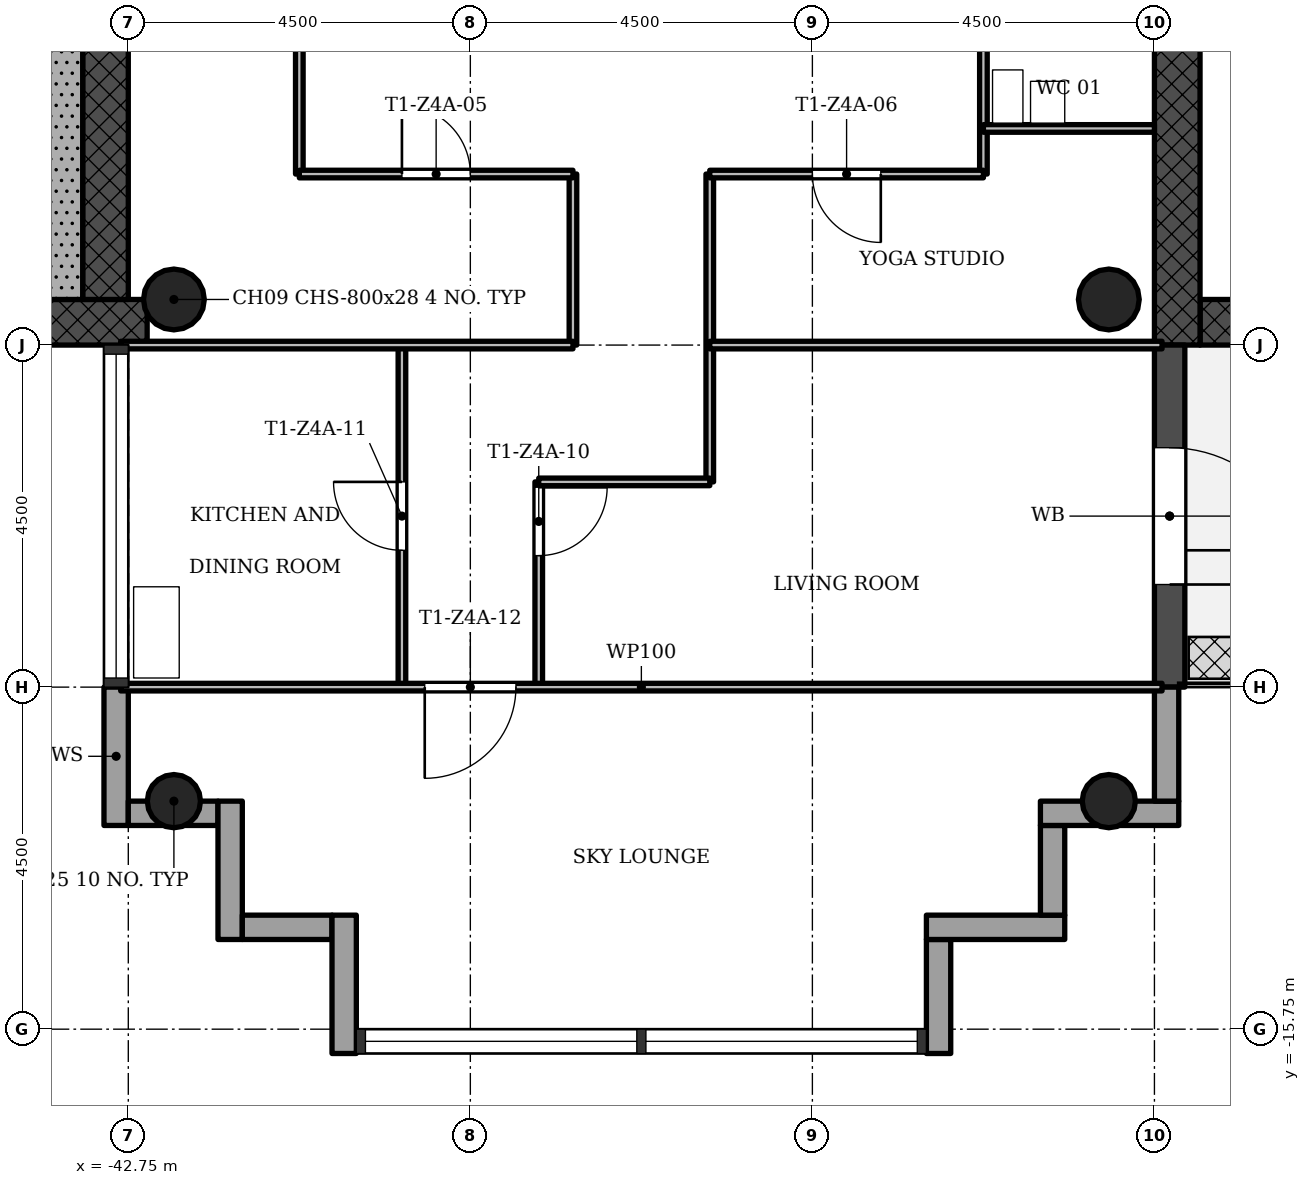
"""IFC4 building model, lengths in metres.
Left out: names, types, materials, properties, quantities, classifications, styles, units other than length and angle.
Written with IfcOpenShell. Run it as: python <this file> out.ifc"""

import sys

from ifc_helpers import new_model, si_unit, direction, frame, frame_2d, origin, origin_2d, place, context, subcontext, project, spatial, rectangle, hollow_circle, extrude, element, fill, save


model = new_model("IFC4")
c1 = context("Model", 3, precision=1e-05, world=origin(), true_north=direction((0.0, 1.0)))
c2 = subcontext(c1, "Body", "Model", "MODEL_VIEW")
j1 = project(units=[si_unit("LENGTHUNIT", "METRE"), si_unit("PLANEANGLEUNIT", "RADIAN")], contexts=[c1])
p1 = place(None, origin())
s1 = spatial("IfcSite", under=j1, at=p1, CompositionType="ELEMENT")
p2 = place(p1, origin())
s2 = spatial("IfcBuilding", under=s1, at=p2, CompositionType="ELEMENT")
p3 = place(p2, frame((0.0, 0.0, 226.6)))
s3 = spatial("IfcBuildingStorey", under=s2, at=p3, CompositionType="ELEMENT", Elevation=226.6)
p4 = place(p3, frame((-28.65, -6.45, 0.0), z_axis=(0.0, 0.0, 1.0), x_axis=(1.0, 0.0, 0.0)))
e1 = element("IfcWall", 1, at=p4, inside=s3, PredefinedType="SHEAR", context=c2, shape_type="SweptSolid", body=[
    extrude(rectangle(XDim=8.4, YDim=0.6, at=frame_2d((4.2, 0.0))), origin(), (0.0, 0.0, 1.0), 3.4),
])
p5 = place(p3, frame((-28.95, 6.15, 0.0), z_axis=(0.0, 0.0, 1.0), x_axis=(0.0, -1.0, 0.0)))
e2 = element("IfcWall", 2, at=p5, inside=s3, PredefinedType="SHEAR", context=c2, shape_type="SweptSolid", body=[
    extrude(rectangle(XDim=12.9, YDim=0.6, at=frame_2d((6.45, 0.0))), origin(), (0.0, 0.0, 1.0), 3.4),
])
p6 = place(p5, frame((5.25, 0.0, 0.0)))
e3 = element("IfcOpeningElement", 3, at=p6, cuts=e2, PredefinedType="OPENING", context=c2, shape_type="SweptSolid", body=[
    extrude(rectangle(XDim=1.8, YDim=2.1, at=frame_2d((0.9, 1.05))), frame((0.0, 0.31, 0.0), z_axis=(0.0, -1.0, 0.0), x_axis=(1.0, 0.0, 0.0)), (0.0, 0.0, 1.0), 0.62),
])
p7 = place(p3, frame((-51.15, -6.45, 0.0), z_axis=(0.0, 0.0, 1.0), x_axis=(1.0, 0.0, 0.0)))
e4 = element("IfcWall", 4, at=p7, inside=s3, PredefinedType="SHEAR", context=c2, shape_type="SweptSolid", body=[
    extrude(rectangle(XDim=8.648, YDim=0.6, at=frame_2d((4.324, 0.0))), origin(), (0.0, 0.0, 1.0), 3.4),
])
p8 = place(p3, frame((-43.05, -6.15, 0.0), z_axis=(0.0, 0.0, 1.0), x_axis=(0.0, 1.0, 0.0)))
e5 = element("IfcWall", 5, at=p8, inside=s3, PredefinedType="SHEAR", context=c2, shape_type="SweptSolid", body=[
    extrude(rectangle(XDim=12.9, YDim=0.6, at=frame_2d((6.45, 0.0))), origin(), (0.0, 0.0, 1.0), 3.4),
])
p9 = place(p8, frame((5.25, 0.0, 0.0)))
e6 = element("IfcOpeningElement", 6, at=p9, cuts=e5, PredefinedType="OPENING", context=c2, shape_type="SweptSolid", body=[
    extrude(rectangle(XDim=1.8, YDim=2.1, at=frame_2d((0.9, 1.05))), frame((0.0, 0.31, 0.0), z_axis=(0.0, -1.0, 0.0), x_axis=(1.0, 0.0, 0.0)), (0.0, 0.0, 1.0), 0.62),
])
for number, where, z_axis, x_axis in (
    (7, (-42.15, -12.75, 0.0), (0.0, 0.0, 1.0), (1.0, 0.0, 0.0)),
    (8, (-29.85, -12.75, 0.0), (0.0, 0.0, 1.0), (1.0, 0.0, 0.0)),
):
    element("IfcColumn", number, at=place(p3, frame(where, z_axis=z_axis, x_axis=x_axis)), inside=s3, PredefinedType="COLUMN", context=c2, shape_type="SweptSolid", body=[
        extrude(hollow_circle(Radius=0.35, WallThickness=0.025, at=origin_2d()), origin(), (0.0, 0.0, 1.0), 3.4),
    ])
for number, where, z_axis, x_axis in (
    (9, (-42.15, -6.15, 0.0), (0.0, 0.0, 1.0), (1.0, 0.0, 0.0)),
    (10, (-29.85, -6.15, 0.0), (0.0, 0.0, 1.0), (1.0, 0.0, 0.0)),
):
    element("IfcColumn", number, at=place(p3, frame(where, z_axis=z_axis, x_axis=x_axis)), inside=s3, PredefinedType="COLUMN", context=c2, shape_type="SweptSolid", body=[
        extrude(hollow_circle(Radius=0.4, WallThickness=0.028, at=origin_2d()), origin(), (0.0, 0.0, 1.0), 3.4),
    ])
p10 = place(p3, frame((-42.91, -11.25, -0.3), z_axis=(0.0, 0.0, 1.0), x_axis=(0.0, -1.0, 0.0)))
e11 = element("IfcWall", 11, at=p10, inside=s3, PredefinedType="STANDARD", context=c2, shape_type="SweptSolid", body=[
    extrude(rectangle(XDim=1.82, YDim=0.32, at=frame_2d((0.91, 0.0))), origin(), (0.0, 0.0, 1.0), 3.4),
])
p11 = place(p3, frame((-42.75, -12.91, -0.3), z_axis=(0.0, 0.0, 1.0), x_axis=(1.0, 0.0, 0.0)))
e12 = element("IfcWall", 12, at=p11, inside=s3, PredefinedType="STANDARD", context=c2, shape_type="SweptSolid", body=[
    extrude(rectangle(XDim=1.18, YDim=0.32, at=frame_2d((0.59, 0.0))), origin(), (0.0, 0.0, 1.0), 3.4),
])
p12 = place(p3, frame((-41.41, -12.75, -0.3), z_axis=(0.0, 0.0, 1.0), x_axis=(0.0, -1.0, 0.0)))
e13 = element("IfcWall", 13, at=p12, inside=s3, PredefinedType="STANDARD", context=c2, shape_type="SweptSolid", body=[
    extrude(rectangle(XDim=1.82, YDim=0.32, at=frame_2d((0.91, 0.0))), origin(), (0.0, 0.0, 1.0), 3.4),
])
p13 = place(p3, frame((-41.25, -14.41, -0.3), z_axis=(0.0, 0.0, 1.0), x_axis=(1.0, 0.0, 0.0)))
e14 = element("IfcWall", 14, at=p13, inside=s3, PredefinedType="STANDARD", context=c2, shape_type="SweptSolid", body=[
    extrude(rectangle(XDim=1.18, YDim=0.32, at=frame_2d((0.59, 0.0))), origin(), (0.0, 0.0, 1.0), 3.4),
])
p14 = place(p3, frame((-39.91, -14.25, -0.3), z_axis=(0.0, 0.0, 1.0), x_axis=(0.0, -1.0, 0.0)))
e15 = element("IfcWall", 15, at=p14, inside=s3, PredefinedType="STANDARD", context=c2, shape_type="SweptSolid", body=[
    extrude(rectangle(XDim=1.82, YDim=0.32, at=frame_2d((0.91, 0.0))), origin(), (0.0, 0.0, 1.0), 3.4),
])
p15 = place(p3, frame((-32.09, -16.07, -0.3), z_axis=(0.0, 0.0, 1.0), x_axis=(0.0, 1.0, 0.0)))
e16 = element("IfcWall", 16, at=p15, inside=s3, PredefinedType="STANDARD", context=c2, shape_type="SweptSolid", body=[
    extrude(rectangle(XDim=1.5, YDim=0.32, at=frame_2d((0.75, 0.0))), origin(), (0.0, 0.0, 1.0), 3.4),
])
p16 = place(p3, frame((-32.25, -14.41, -0.3), z_axis=(0.0, 0.0, 1.0), x_axis=(1.0, 0.0, 0.0)))
e17 = element("IfcWall", 17, at=p16, inside=s3, PredefinedType="STANDARD", context=c2, shape_type="SweptSolid", body=[
    extrude(rectangle(XDim=1.82, YDim=0.32, at=frame_2d((0.91, 0.0))), origin(), (0.0, 0.0, 1.0), 3.4),
])
p17 = place(p3, frame((-30.59, -14.25, -0.3), z_axis=(0.0, 0.0, 1.0), x_axis=(0.0, 1.0, 0.0)))
e18 = element("IfcWall", 18, at=p17, inside=s3, PredefinedType="STANDARD", context=c2, shape_type="SweptSolid", body=[
    extrude(rectangle(XDim=1.18, YDim=0.32, at=frame_2d((0.59, 0.0))), origin(), (0.0, 0.0, 1.0), 3.4),
])
p18 = place(p3, frame((-30.75, -12.91, -0.3), z_axis=(0.0, 0.0, 1.0), x_axis=(1.0, 0.0, 0.0)))
e19 = element("IfcWall", 19, at=p18, inside=s3, PredefinedType="STANDARD", context=c2, shape_type="SweptSolid", body=[
    extrude(rectangle(XDim=1.82, YDim=0.32, at=frame_2d((0.91, 0.0))), origin(), (0.0, 0.0, 1.0), 3.4),
])
p19 = place(p3, frame((-29.09, -12.75, -0.3), z_axis=(0.0, 0.0, 1.0), x_axis=(0.0, 1.0, 0.0)))
e20 = element("IfcWall", 20, at=p19, inside=s3, PredefinedType="STANDARD", context=c2, shape_type="SweptSolid", body=[
    extrude(rectangle(XDim=1.5, YDim=0.32, at=frame_2d((0.75, 0.0))), origin(), (0.0, 0.0, 1.0), 3.4),
])
p20 = place(p3, frame((-29.05, -11.25, -0.02), z_axis=(0.0, 0.0, 1.0), x_axis=(0.0, 1.0, 0.0)))
e21 = element("IfcWall", 21, at=p20, inside=s3, PredefinedType="STANDARD", context=c2, shape_type="SweptSolid", body=[
    extrude(rectangle(XDim=4.5, YDim=0.4, at=frame_2d((2.25, 0.0))), origin(), (0.0, 0.0, 1.0), 3.12),
])
p21 = place(p20, frame((1.35, 0.0, 0.02)))
e22 = element("IfcOpeningElement", 22, at=p21, cuts=e21, PredefinedType="OPENING", context=c2, shape_type="SweptSolid", body=[
    extrude(rectangle(XDim=1.8, YDim=2.1, at=frame_2d((0.9, 1.05))), frame((0.0, 0.21, 0.0), z_axis=(0.0, -1.0, 0.0), x_axis=(1.0, 0.0, 0.0)), (0.0, 0.0, 1.0), 0.42),
])
p22 = place(p3, frame((-40.5, -4.5, 0.0), z_axis=(0.0, 0.0, 1.0), x_axis=(0.0, 1.0, 0.0)))
e23 = element("IfcWall", 23, at=p22, inside=s3, PredefinedType="PARTITIONING", context=c2, shape_type="SweptSolid", body=[
    extrude(rectangle(XDim=3.0, YDim=0.1, at=frame_2d((1.5, 0.0))), origin(), (0.0, 0.0, 1.0), 3.0),
])
p23 = place(p3, frame((-39.15, -11.25, 0.0), z_axis=(0.0, 0.0, 1.0), x_axis=(0.0, 1.0, 0.0)))
e24 = element("IfcWall", 24, at=p23, inside=s3, PredefinedType="PARTITIONING", context=c2, shape_type="SweptSolid", body=[
    extrude(rectangle(XDim=4.5, YDim=0.1, at=frame_2d((2.25, 0.0))), origin(), (0.0, 0.0, 1.0), 3.0),
])
p24 = place(p23, frame((1.8, 0.0, 0.0)))
e25 = element("IfcOpeningElement", 25, at=p24, cuts=e24, PredefinedType="OPENING", context=c2, shape_type="SweptSolid", body=[
    extrude(rectangle(XDim=0.9, YDim=2.1, at=frame_2d((0.45, 1.05))), frame((0.0, 0.06, 0.0), z_axis=(0.0, -1.0, 0.0), x_axis=(1.0, 0.0, 0.0)), (0.0, 0.0, 1.0), 0.12),
])
p25 = place(p3, frame((-37.35, -11.25, 0.0), z_axis=(0.0, 0.0, 1.0), x_axis=(0.0, 1.0, 0.0)))
e26 = element("IfcWall", 26, at=p25, inside=s3, PredefinedType="PARTITIONING", context=c2, shape_type="SweptSolid", body=[
    extrude(rectangle(XDim=2.7, YDim=0.1, at=frame_2d((1.35, 0.0))), origin(), (0.0, 0.0, 1.0), 3.0),
])
p26 = place(p25, frame((1.73, 0.0, 0.0)))
e27 = element("IfcOpeningElement", 27, at=p26, cuts=e26, PredefinedType="OPENING", context=c2, shape_type="SweptSolid", body=[
    extrude(rectangle(XDim=0.9, YDim=2.1, at=frame_2d((0.45, 1.05))), frame((0.0, 0.06, 0.0), z_axis=(0.0, -1.0, 0.0), x_axis=(1.0, 0.0, 0.0)), (0.0, 0.0, 1.0), 0.12),
])
p27 = place(p3, frame((-36.9, -6.75, 0.0), z_axis=(0.0, 0.0, 1.0), x_axis=(0.0, 1.0, 0.0)))
e28 = element("IfcWall", 28, at=p27, inside=s3, PredefinedType="PARTITIONING", context=c2, shape_type="SweptSolid", body=[
    extrude(rectangle(XDim=2.25, YDim=0.1, at=frame_2d((1.125, 0.0))), origin(), (0.0, 0.0, 1.0), 3.0),
])
p28 = place(p3, frame((-35.1, -8.55, 0.0), z_axis=(0.0, 0.0, 1.0), x_axis=(0.0, 1.0, 0.0)))
e29 = element("IfcWall", 29, at=p28, inside=s3, PredefinedType="PARTITIONING", context=c2, shape_type="SweptSolid", body=[
    extrude(rectangle(XDim=4.05, YDim=0.1, at=frame_2d((2.025, 0.0))), origin(), (0.0, 0.0, 1.0), 3.0),
])
p29 = place(p3, frame((-31.5, -4.5, 0.0), z_axis=(0.0, 0.0, 1.0), x_axis=(0.0, 1.0, 0.0)))
e30 = element("IfcWall", 30, at=p29, inside=s3, PredefinedType="PARTITIONING", context=c2, shape_type="SweptSolid", body=[
    extrude(rectangle(XDim=3.0, YDim=0.1, at=frame_2d((1.5, 0.0))), origin(), (0.0, 0.0, 1.0), 3.0),
])
p30 = place(p3, frame((-42.85, -11.25, 0.0), z_axis=(0.0, 0.0, 1.0), x_axis=(1.0, 0.0, 0.0)))
e31 = element("IfcWall", 31, at=p30, inside=s3, PredefinedType="PARTITIONING", context=c2, shape_type="SweptSolid", body=[
    extrude(rectangle(XDim=13.7, YDim=0.1, at=frame_2d((6.85, 0.0))), origin(), (0.0, 0.0, 1.0), 3.0),
])
p31 = place(p30, frame((4.0, 0.0, 0.0)))
e32 = element("IfcOpeningElement", 32, at=p31, cuts=e31, PredefinedType="OPENING", context=c2, shape_type="SweptSolid", body=[
    extrude(rectangle(XDim=1.2, YDim=2.1, at=frame_2d((0.6, 1.05))), frame((0.0, 0.06, 0.0), z_axis=(0.0, -1.0, 0.0), x_axis=(1.0, 0.0, 0.0)), (0.0, 0.0, 1.0), 0.12),
])
p32 = place(p3, frame((-37.35, -8.55, 0.0), z_axis=(0.0, 0.0, 1.0), x_axis=(1.0, 0.0, 0.0)))
e33 = element("IfcWall", 33, at=p32, inside=s3, PredefinedType="PARTITIONING", context=c2, shape_type="SweptSolid", body=[
    extrude(rectangle(XDim=2.25, YDim=0.1, at=frame_2d((1.125, 0.0))), origin(), (0.0, 0.0, 1.0), 3.0),
])
for number, where, z_axis, x_axis in (
    (34, (-42.85, -6.75, 0.0), (0.0, 0.0, 1.0), (1.0, 0.0, 0.0)),
    (35, (-35.1, -6.75, 0.0), (0.0, 0.0, 1.0), (1.0, 0.0, 0.0)),
):
    element("IfcWall", number, at=place(p3, frame(where, z_axis=z_axis, x_axis=x_axis)), inside=s3, PredefinedType="PARTITIONING", context=c2, shape_type="SweptSolid", body=[
        extrude(rectangle(XDim=5.95, YDim=0.1, at=frame_2d((2.975, 0.0))), origin(), (0.0, 0.0, 1.0), 3.0),
    ])
p33 = place(p3, frame((-40.5, -4.5, 0.0), z_axis=(0.0, 0.0, 1.0), x_axis=(1.0, 0.0, 0.0)))
e36 = element("IfcWall", 36, at=p33, inside=s3, PredefinedType="PARTITIONING", context=c2, shape_type="SweptSolid", body=[
    extrude(rectangle(XDim=3.6, YDim=0.1, at=frame_2d((1.8, 0.0))), origin(), (0.0, 0.0, 1.0), 3.0),
])
p34 = place(p33, frame((1.35, 0.0, 0.0)))
e37 = element("IfcOpeningElement", 37, at=p34, cuts=e36, PredefinedType="OPENING", context=c2, shape_type="SweptSolid", body=[
    extrude(rectangle(XDim=0.9, YDim=2.1, at=frame_2d((0.45, 1.05))), frame((0.0, 0.06, 0.0), z_axis=(0.0, -1.0, 0.0), x_axis=(1.0, 0.0, 0.0)), (0.0, 0.0, 1.0), 0.12),
])
p35 = place(p3, frame((-35.1, -4.5, 0.0), z_axis=(0.0, 0.0, 1.0), x_axis=(1.0, 0.0, 0.0)))
e38 = element("IfcWall", 38, at=p35, inside=s3, PredefinedType="PARTITIONING", context=c2, shape_type="SweptSolid", body=[
    extrude(rectangle(XDim=3.6, YDim=0.1, at=frame_2d((1.8, 0.0))), origin(), (0.0, 0.0, 1.0), 3.0),
])
p36 = place(p35, frame((1.35, 0.0, 0.0)))
e39 = element("IfcOpeningElement", 39, at=p36, cuts=e38, PredefinedType="OPENING", context=c2, shape_type="SweptSolid", body=[
    extrude(rectangle(XDim=0.9, YDim=2.1, at=frame_2d((0.45, 1.05))), frame((0.0, 0.06, 0.0), z_axis=(0.0, -1.0, 0.0), x_axis=(1.0, 0.0, 0.0)), (0.0, 0.0, 1.0), 0.12),
])
p37 = place(p3, frame((-31.5, -3.9, 0.0), z_axis=(0.0, 0.0, 1.0), x_axis=(1.0, 0.0, 0.0)))
e40 = element("IfcWall", 40, at=p37, inside=s3, PredefinedType="PARTITIONING", context=c2, shape_type="SweptSolid", body=[
    extrude(rectangle(XDim=2.25, YDim=0.1, at=frame_2d((1.125, 0.0))), origin(), (0.0, 0.0, 1.0), 3.0),
])
p38 = place(p3, frame((-43.65, -1.85, 0.0), z_axis=(0.0, 0.0, 1.0), x_axis=(0.0, -1.0, 0.0)))
e41 = element("IfcWall", 41, at=p38, inside=s3, PredefinedType="SHEAR", context=c2, shape_type="SweptSolid", body=[
    extrude(rectangle(XDim=4.3, YDim=0.6, at=frame_2d((2.15, 0.0))), origin(), (0.0, 0.0, 1.0), 3.4),
])
p39 = place(p21, origin())
e42 = element("IfcDoor", 42, at=p39, inside=s3, OperationType="SINGLE_SWING_LEFT", PredefinedType="DOOR", context=c2, shape_type="SweptSolid", body=[
    extrude(rectangle(XDim=1.8, YDim=2.1, at=frame_2d((0.9, 1.05))), frame((0.0, 0.025, 0.0), z_axis=(0.0, -1.0, 0.0), x_axis=(1.0, 0.0, 0.0)), (0.0, 0.0, 1.0), 0.05),
])
fill(e22, e42)
p40 = place(p34, origin())
e43 = element("IfcDoor", 43, at=p40, inside=s3, OperationType="SINGLE_SWING_RIGHT", PredefinedType="DOOR", context=c2, shape_type="SweptSolid", body=[
    extrude(rectangle(XDim=0.9, YDim=2.1, at=frame_2d((0.45, 1.05))), frame((0.0, 0.025, 0.0), z_axis=(0.0, -1.0, 0.0), x_axis=(1.0, 0.0, 0.0)), (0.0, 0.0, 1.0), 0.05),
])
fill(e37, e43)
p41 = place(p36, origin())
e44 = element("IfcDoor", 44, at=p41, inside=s3, OperationType="SINGLE_SWING_RIGHT", PredefinedType="DOOR", context=c2, shape_type="SweptSolid", body=[
    extrude(rectangle(XDim=0.9, YDim=2.1, at=frame_2d((0.45, 1.05))), frame((0.0, 0.025, 0.0), z_axis=(0.0, -1.0, 0.0), x_axis=(1.0, 0.0, 0.0)), (0.0, 0.0, 1.0), 0.05),
])
fill(e39, e44)
p42 = place(p26, origin())
e45 = element("IfcDoor", 45, at=p42, inside=s3, OperationType="SINGLE_SWING_RIGHT", PredefinedType="DOOR", context=c2, shape_type="SweptSolid", body=[
    extrude(rectangle(XDim=0.9, YDim=2.1, at=frame_2d((0.45, 1.05))), frame((0.0, 0.025, 0.0), z_axis=(0.0, -1.0, 0.0), x_axis=(1.0, 0.0, 0.0)), (0.0, 0.0, 1.0), 0.05),
])
fill(e27, e45)
p43 = place(p24, origin())
e46 = element("IfcDoor", 46, at=p43, inside=s3, OperationType="SINGLE_SWING_LEFT", PredefinedType="DOOR", context=c2, shape_type="SweptSolid", body=[
    extrude(rectangle(XDim=0.9, YDim=2.1, at=frame_2d((0.45, 1.05))), frame((0.0, 0.025, 0.0), z_axis=(0.0, -1.0, 0.0), x_axis=(1.0, 0.0, 0.0)), (0.0, 0.0, 1.0), 0.05),
])
fill(e25, e46)
p44 = place(p31, origin())
e47 = element("IfcDoor", 47, at=p44, inside=s3, OperationType="SINGLE_SWING_LEFT", PredefinedType="DOOR", context=c2, shape_type="SweptSolid", body=[
    extrude(rectangle(XDim=1.2, YDim=2.1, at=frame_2d((0.6, 1.05))), frame((0.0, 0.025, 0.0), z_axis=(0.0, -1.0, 0.0), x_axis=(1.0, 0.0, 0.0)), (0.0, 0.0, 1.0), 0.05),
])
fill(e32, e47)
save(model, sys.argv[1])
